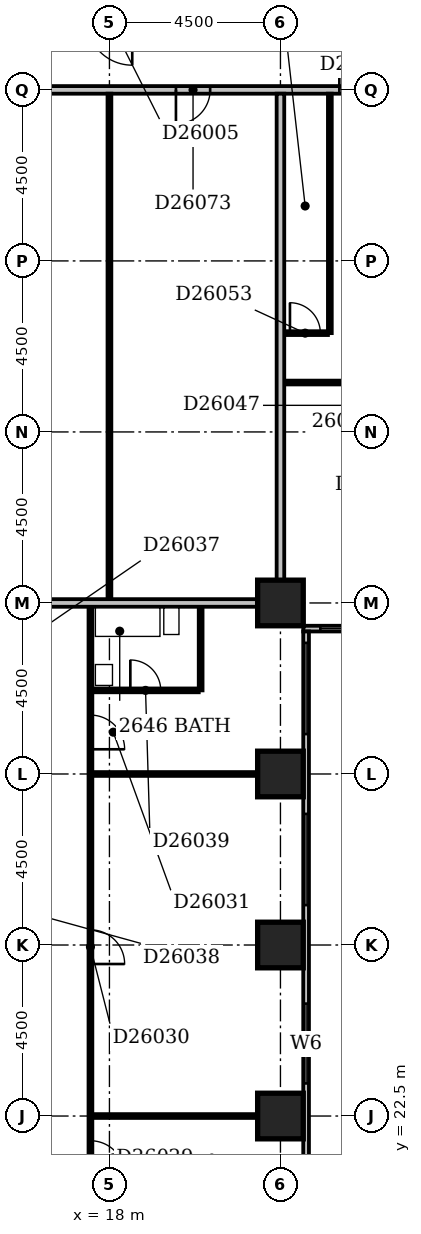
"""IFC4 building model, lengths in metres.
Left out: names, types, materials, properties, quantities, classifications, styles, units other than length and angle.
Written with IfcOpenShell. Run it as: python <this file> out.ifc"""

import sys

from ifc_helpers import new_model, si_unit, direction, frame, frame_2d, origin, origin_2d, place, context, subcontext, project, spatial, rectangle, extrude, element, fill, save


model = new_model("IFC4")
c1 = context("Model", 3, precision=1e-05, world=origin(), true_north=direction((0.0, 1.0)))
c2 = subcontext(c1, "Body", "Model", "MODEL_VIEW")
j1 = project(units=[si_unit("LENGTHUNIT", "METRE"), si_unit("PLANEANGLEUNIT", "RADIAN")], contexts=[c1])
p1 = place(None, origin())
s1 = spatial("IfcSite", under=j1, at=p1, CompositionType="ELEMENT")
p2 = place(p1, origin())
s2 = spatial("IfcBuilding", under=s1, at=p2, CompositionType="ELEMENT")
p3 = place(p2, frame((0.0, 0.0, 104.6)))
s3 = spatial("IfcBuildingStorey", under=s2, at=p3, CompositionType="ELEMENT", Elevation=104.6)
for number, where, z_axis, x_axis in (
    (1, (22.5, 22.5, -0.3), (0.0, 0.0, 1.0), (1.0, 0.0, 0.0)),
    (2, (22.5, 27.0, -0.3), (0.0, 0.0, 1.0), (1.0, 0.0, 0.0)),
    (3, (22.5, 31.5, -0.3), (0.0, 0.0, 1.0), (1.0, 0.0, 0.0)),
    (4, (22.5, 36.0, -0.3), (0.0, 0.0, 1.0), (1.0, 0.0, 0.0)),
):
    element("IfcColumn", number, at=place(p3, frame(where, z_axis=z_axis, x_axis=x_axis)), inside=s3, PredefinedType="COLUMN", context=c2, shape_type="SweptSolid", body=[
        extrude(rectangle(XDim=1.2, YDim=1.2, at=origin_2d()), origin(), (0.0, 0.0, 1.0), 3.45),
    ])
p4 = place(p3, frame((23.175, 17.4, 0.0), z_axis=(0.0, 0.0, 1.0), x_axis=(0.0, 1.0, 0.0)))
e5 = element("IfcWall", 5, at=p4, inside=s3, PredefinedType="STANDARD", context=c2, shape_type="SweptSolid", body=[
    extrude(rectangle(XDim=17.85, YDim=0.15, at=frame_2d((8.925, 0.0))), origin(), (0.0, 0.0, 1.0), 2.5),
])
p5 = place(p4, frame((1.65, 0.0, 0.6)))
e6 = element("IfcOpeningElement", 6, at=p5, cuts=e5, PredefinedType="OPENING", context=c2, shape_type="SweptSolid", body=[
    extrude(rectangle(XDim=2.4, YDim=1.8, at=frame_2d((1.2, 0.9))), frame((0.0, 0.087, 0.0), z_axis=(0.0, -1.0, 0.0), x_axis=(1.0, 0.0, 0.0)), (0.0, 0.0, 1.0), 0.174),
])
p6 = place(p4, frame((5.958, 0.0, 0.6)))
e7 = element("IfcOpeningElement", 7, at=p6, cuts=e5, PredefinedType="OPENING", context=c2, shape_type="SweptSolid", body=[
    extrude(rectangle(XDim=2.1, YDim=1.8, at=frame_2d((1.05, 0.9))), frame((0.0, 0.087, 0.0), z_axis=(0.0, -1.0, 0.0), x_axis=(1.0, 0.0, 0.0)), (0.0, 0.0, 1.0), 0.174),
])
p7 = place(p4, frame((10.65, 0.0, 0.6)))
e8 = element("IfcOpeningElement", 8, at=p7, cuts=e5, PredefinedType="OPENING", context=c2, shape_type="SweptSolid", body=[
    extrude(rectangle(XDim=2.4, YDim=1.8, at=frame_2d((1.2, 0.9))), frame((0.0, 0.087, 0.0), z_axis=(0.0, -1.0, 0.0), x_axis=(1.0, 0.0, 0.0)), (0.0, 0.0, 1.0), 0.174),
])
p8 = place(p4, frame((15.15, 0.0, 0.6)))
e9 = element("IfcOpeningElement", 9, at=p8, cuts=e5, PredefinedType="OPENING", context=c2, shape_type="SweptSolid", body=[
    extrude(rectangle(XDim=2.4, YDim=1.8, at=frame_2d((1.2, 0.9))), frame((0.0, 0.087, 0.0), z_axis=(0.0, -1.0, 0.0), x_axis=(1.0, 0.0, 0.0)), (0.0, 0.0, 1.0), 0.174),
])
p9 = place(p3, frame((23.1, 35.325, 0.0), z_axis=(0.0, 0.0, 1.0), x_axis=(1.0, 0.0, 0.0)))
e10 = element("IfcWall", 10, at=p9, inside=s3, PredefinedType="STANDARD", context=c2, shape_type="SweptSolid", body=[
    extrude(rectangle(XDim=45.15, YDim=0.15, at=frame_2d((22.575, 0.0))), origin(), (0.0, 0.0, 1.0), 2.5),
])
p10 = place(p9, frame((0.45, 0.0, 0.6)))
e11 = element("IfcOpeningElement", 11, at=p10, cuts=e10, PredefinedType="OPENING", context=c2, shape_type="SweptSolid", body=[
    extrude(rectangle(XDim=2.4, YDim=1.8, at=frame_2d((1.2, 0.9))), frame((0.0, 0.087, 0.0), z_axis=(0.0, -1.0, 0.0), x_axis=(1.0, 0.0, 0.0)), (0.0, 0.0, 1.0), 0.174),
])
p11 = place(p9, frame((4.831, 0.0, 0.6)))
e12 = element("IfcOpeningElement", 12, at=p11, cuts=e10, PredefinedType="OPENING", context=c2, shape_type="SweptSolid", body=[
    extrude(rectangle(XDim=0.9, YDim=1.8, at=frame_2d((0.45, 0.9))), frame((0.0, 0.087, 0.0), z_axis=(0.0, -1.0, 0.0), x_axis=(1.0, 0.0, 0.0)), (0.0, 0.0, 1.0), 0.174),
])
p12 = place(p9, frame((9.45, 0.0, 0.6)))
e13 = element("IfcOpeningElement", 13, at=p12, cuts=e10, PredefinedType="OPENING", context=c2, shape_type="SweptSolid", body=[
    extrude(rectangle(XDim=2.4, YDim=1.8, at=frame_2d((1.2, 0.9))), frame((0.0, 0.087, 0.0), z_axis=(0.0, -1.0, 0.0), x_axis=(1.0, 0.0, 0.0)), (0.0, 0.0, 1.0), 0.174),
])
p13 = place(p9, frame((13.95, 0.0, 0.6)))
e14 = element("IfcOpeningElement", 14, at=p13, cuts=e10, PredefinedType="OPENING", context=c2, shape_type="SweptSolid", body=[
    extrude(rectangle(XDim=2.4, YDim=1.8, at=frame_2d((1.2, 0.9))), frame((0.0, 0.087, 0.0), z_axis=(0.0, -1.0, 0.0), x_axis=(1.0, 0.0, 0.0)), (0.0, 0.0, 1.0), 0.174),
])
p14 = place(p9, frame((18.234, 0.0, 0.6)))
e15 = element("IfcOpeningElement", 15, at=p14, cuts=e10, PredefinedType="OPENING", context=c2, shape_type="SweptSolid", body=[
    extrude(rectangle(XDim=0.6, YDim=1.8, at=frame_2d((0.3, 0.9))), frame((0.0, 0.087, 0.0), z_axis=(0.0, -1.0, 0.0), x_axis=(1.0, 0.0, 0.0)), (0.0, 0.0, 1.0), 0.174),
])
p15 = place(p9, frame((20.492, 0.0, 0.6)))
e16 = element("IfcOpeningElement", 16, at=p15, cuts=e10, PredefinedType="OPENING", context=c2, shape_type="SweptSolid", body=[
    extrude(rectangle(XDim=0.6, YDim=1.8, at=frame_2d((0.3, 0.9))), frame((0.0, 0.087, 0.0), z_axis=(0.0, -1.0, 0.0), x_axis=(1.0, 0.0, 0.0)), (0.0, 0.0, 1.0), 0.174),
])
p16 = place(p9, frame((22.95, 0.0, 0.6)))
e17 = element("IfcOpeningElement", 17, at=p16, cuts=e10, PredefinedType="OPENING", context=c2, shape_type="SweptSolid", body=[
    extrude(rectangle(XDim=2.4, YDim=1.8, at=frame_2d((1.2, 0.9))), frame((0.0, 0.087, 0.0), z_axis=(0.0, -1.0, 0.0), x_axis=(1.0, 0.0, 0.0)), (0.0, 0.0, 1.0), 0.174),
])
p17 = place(p9, frame((27.45, 0.0, 0.6)))
e18 = element("IfcOpeningElement", 18, at=p17, cuts=e10, PredefinedType="OPENING", context=c2, shape_type="SweptSolid", body=[
    extrude(rectangle(XDim=2.4, YDim=1.8, at=frame_2d((1.2, 0.9))), frame((0.0, 0.087, 0.0), z_axis=(0.0, -1.0, 0.0), x_axis=(1.0, 0.0, 0.0)), (0.0, 0.0, 1.0), 0.174),
])
p18 = place(p9, frame((31.95, 0.0, 0.6)))
e19 = element("IfcOpeningElement", 19, at=p18, cuts=e10, PredefinedType="OPENING", context=c2, shape_type="SweptSolid", body=[
    extrude(rectangle(XDim=2.4, YDim=1.8, at=frame_2d((1.2, 0.9))), frame((0.0, 0.087, 0.0), z_axis=(0.0, -1.0, 0.0), x_axis=(1.0, 0.0, 0.0)), (0.0, 0.0, 1.0), 0.174),
])
p19 = place(p9, frame((36.45, 0.0, 0.6)))
e20 = element("IfcOpeningElement", 20, at=p19, cuts=e10, PredefinedType="OPENING", context=c2, shape_type="SweptSolid", body=[
    extrude(rectangle(XDim=2.4, YDim=1.8, at=frame_2d((1.2, 0.9))), frame((0.0, 0.087, 0.0), z_axis=(0.0, -1.0, 0.0), x_axis=(1.0, 0.0, 0.0)), (0.0, 0.0, 1.0), 0.174),
])
p20 = place(p9, frame((40.95, 0.0, 0.6)))
e21 = element("IfcOpeningElement", 21, at=p20, cuts=e10, PredefinedType="OPENING", context=c2, shape_type="SweptSolid", body=[
    extrude(rectangle(XDim=2.4, YDim=1.8, at=frame_2d((1.2, 0.9))), frame((0.0, 0.087, 0.0), z_axis=(0.0, -1.0, 0.0), x_axis=(1.0, 0.0, 0.0)), (0.0, 0.0, 1.0), 0.174),
])
p21 = place(p3, frame((17.5, 18.1, 0.0), z_axis=(0.0, 0.0, 1.0), x_axis=(0.0, 1.0, 0.0)))
e22 = element("IfcWall", 22, at=p21, inside=s3, PredefinedType="PARTITIONING", context=c2, shape_type="SweptSolid", body=[
    extrude(rectangle(XDim=17.8, YDim=0.1, at=frame_2d((8.9, 0.0))), origin(), (0.0, 0.0, 1.0), 3.15),
])
p22 = place(p21, frame((2.85, 0.0, 0.0)))
e23 = element("IfcOpeningElement", 23, at=p22, cuts=e22, PredefinedType="OPENING", context=c2, shape_type="SweptSolid", body=[
    extrude(rectangle(XDim=0.9, YDim=2.1, at=frame_2d((0.45, 1.05))), frame((0.0, 0.062, 0.0), z_axis=(0.0, -1.0, 0.0), x_axis=(1.0, 0.0, 0.0)), (0.0, 0.0, 1.0), 0.124),
])
p23 = place(p21, frame((8.4, 0.0, 0.0)))
e24 = element("IfcOpeningElement", 24, at=p23, cuts=e22, PredefinedType="OPENING", context=c2, shape_type="SweptSolid", body=[
    extrude(rectangle(XDim=0.9, YDim=2.1, at=frame_2d((0.45, 1.05))), frame((0.0, 0.062, 0.0), z_axis=(0.0, -1.0, 0.0), x_axis=(1.0, 0.0, 0.0)), (0.0, 0.0, 1.0), 0.124),
])
p24 = place(p21, frame((14.05, 0.0, 0.0)))
e25 = element("IfcOpeningElement", 25, at=p24, cuts=e22, PredefinedType="OPENING", context=c2, shape_type="SweptSolid", body=[
    extrude(rectangle(XDim=0.9, YDim=2.1, at=frame_2d((0.45, 1.05))), frame((0.0, 0.062, 0.0), z_axis=(0.0, -1.0, 0.0), x_axis=(1.0, 0.0, 0.0)), (0.0, 0.0, 1.0), 0.124),
])
for number, where, z_axis, x_axis in (
    (26, (17.55, 22.5, 0.0), (0.0, 0.0, 1.0), (1.0, 0.0, 0.0)),
    (27, (17.55, 31.5, 0.0), (0.0, 0.0, 1.0), (1.0, 0.0, 0.0)),
):
    element("IfcWall", number, at=place(p3, frame(where, z_axis=z_axis, x_axis=x_axis)), inside=s3, PredefinedType="PARTITIONING", context=c2, shape_type="SweptSolid", body=[
        extrude(rectangle(XDim=4.35, YDim=0.1, at=frame_2d((2.175, 0.0))), origin(), (0.0, 0.0, 1.0), 3.15),
    ])
p25 = place(p3, frame((17.55, 33.7, 0.0), z_axis=(0.0, 0.0, 1.0), x_axis=(1.0, 0.0, 0.0)))
e28 = element("IfcWall", 28, at=p25, inside=s3, PredefinedType="PLUMBINGWALL", context=c2, shape_type="SweptSolid", body=[
    extrude(rectangle(XDim=2.8, YDim=0.1, at=frame_2d((1.4, 0.0))), origin(), (0.0, 0.0, 1.0), 3.15),
])
p26 = place(p25, frame((1.0, 0.0, 0.0)))
e29 = element("IfcOpeningElement", 29, at=p26, cuts=e28, PredefinedType="OPENING", context=c2, shape_type="SweptSolid", body=[
    extrude(rectangle(XDim=0.8, YDim=2.1, at=frame_2d((0.4, 1.05))), frame((0.0, 0.062, 0.0), z_axis=(0.0, -1.0, 0.0), x_axis=(1.0, 0.0, 0.0)), (0.0, 0.0, 1.0), 0.124),
])
p27 = place(p3, frame((20.4, 33.7, 0.0), z_axis=(0.0, 0.0, 1.0), x_axis=(0.0, 1.0, 0.0)))
e30 = element("IfcWall", 30, at=p27, inside=s3, PredefinedType="PLUMBINGWALL", context=c2, shape_type="SweptSolid", body=[
    extrude(rectangle(XDim=2.2, YDim=0.1, at=frame_2d((1.1, 0.0))), origin(), (0.0, 0.0, 1.0), 3.15),
])
p28 = place(p3, frame((9.1, 36.0, 0.0), z_axis=(0.0, 0.0, 1.0), x_axis=(1.0, 0.0, 0.0)))
e31 = element("IfcWall", 31, at=p28, inside=s3, PredefinedType="PARTITIONING", context=c2, shape_type="SweptSolid", body=[
    extrude(rectangle(XDim=12.8, YDim=0.2, at=frame_2d((6.4, 0.0))), origin(), (0.0, 0.0, 1.0), 2.25),
])
p29 = place(p3, frame((18.0, 36.1, 0.0), z_axis=(0.0, 0.0, 1.0), x_axis=(0.0, 1.0, 0.0)))
e32 = element("IfcWall", 32, at=p29, inside=s3, PredefinedType="PARTITIONING", context=c2, shape_type="SweptSolid", body=[
    extrude(rectangle(XDim=13.3, YDim=0.1, at=frame_2d((6.65, 0.0))), origin(), (0.0, 0.0, 1.0), 3.15),
])
p30 = place(p3, frame((22.5, 36.6, 0.0), z_axis=(0.0, 0.0, 1.0), x_axis=(0.0, 1.0, 0.0)))
e33 = element("IfcWall", 33, at=p30, inside=s3, PredefinedType="PARTITIONING", context=c2, shape_type="SweptSolid", body=[
    extrude(rectangle(XDim=12.8, YDim=0.2, at=frame_2d((6.4, 0.0))), origin(), (0.0, 0.0, 1.0), 3.15),
])
p31 = place(p3, frame((22.6, 41.8, 0.0), z_axis=(0.0, 0.0, 1.0), x_axis=(1.0, 0.0, 0.0)))
e34 = element("IfcWall", 34, at=p31, inside=s3, PredefinedType="PARTITIONING", context=c2, shape_type="SweptSolid", body=[
    extrude(rectangle(XDim=4.3, YDim=0.1, at=frame_2d((2.15, 0.0))), origin(), (0.0, 0.0, 1.0), 3.15),
])
p32 = place(p31, frame((1.7, 0.0, 0.0)))
e35 = element("IfcOpeningElement", 35, at=p32, cuts=e34, PredefinedType="OPENING", context=c2, shape_type="SweptSolid", body=[
    extrude(rectangle(XDim=0.9, YDim=2.1, at=frame_2d((0.45, 1.05))), frame((0.0, 0.062, 0.0), z_axis=(0.0, -1.0, 0.0), x_axis=(1.0, 0.0, 0.0)), (0.0, 0.0, 1.0), 0.124),
])
p33 = place(p3, frame((22.6, 43.1, 0.0), z_axis=(0.0, 0.0, 1.0), x_axis=(1.0, 0.0, 0.0)))
e36 = element("IfcWall", 36, at=p33, inside=s3, PredefinedType="PARTITIONING", context=c2, shape_type="SweptSolid", body=[
    extrude(rectangle(XDim=1.15, YDim=0.1, at=frame_2d((0.575, 0.0))), origin(), (0.0, 0.0, 1.0), 3.15),
])
p34 = place(p33, frame((0.15, 0.0, 0.0)))
e37 = element("IfcOpeningElement", 37, at=p34, cuts=e36, PredefinedType="OPENING", context=c2, shape_type="SweptSolid", body=[
    extrude(rectangle(XDim=0.8, YDim=2.1, at=frame_2d((0.4, 1.05))), frame((0.0, 0.062, 0.0), z_axis=(0.0, -1.0, 0.0), x_axis=(1.0, 0.0, 0.0)), (0.0, 0.0, 1.0), 0.124),
])
p35 = place(p3, frame((23.8, 43.1, 0.0), z_axis=(0.0, 0.0, 1.0), x_axis=(0.0, 1.0, 0.0)))
e38 = element("IfcWall", 38, at=p35, inside=s3, PredefinedType="PARTITIONING", context=c2, shape_type="SweptSolid", body=[
    extrude(rectangle(XDim=6.3, YDim=0.1, at=frame_2d((3.15, 0.0))), origin(), (0.0, 0.0, 1.0), 3.15),
])
p36 = place(p3, frame((9.1, 49.5, 0.0), z_axis=(0.0, 0.0, 1.0), x_axis=(1.0, 0.0, 0.0)))
e39 = element("IfcWall", 39, at=p36, inside=s3, PredefinedType="PARTITIONING", context=c2, shape_type="SweptSolid", body=[
    extrude(rectangle(XDim=57.8, YDim=0.2, at=frame_2d((28.9, 0.0))), origin(), (0.0, 0.0, 1.0), 3.15),
])
p37 = place(p36, frame((14.95, 0.0, 0.0)))
e40 = element("IfcOpeningElement", 40, at=p37, cuts=e39, PredefinedType="OPENING", context=c2, shape_type="SweptSolid", body=[
    extrude(rectangle(XDim=1.0, YDim=2.1, at=frame_2d((0.5, 1.05))), frame((0.0, 0.112, 0.0), z_axis=(0.0, -1.0, 0.0), x_axis=(1.0, 0.0, 0.0)), (0.0, 0.0, 1.0), 0.224),
])
p38 = place(p36, frame((20.6, 0.0, 0.0)))
e41 = element("IfcOpeningElement", 41, at=p38, cuts=e39, PredefinedType="OPENING", context=c2, shape_type="SweptSolid", body=[
    extrude(rectangle(XDim=1.0, YDim=2.1, at=frame_2d((0.5, 1.05))), frame((0.0, 0.112, 0.0), z_axis=(0.0, -1.0, 0.0), x_axis=(1.0, 0.0, 0.0)), (0.0, 0.0, 1.0), 0.224),
])
p39 = place(p36, frame((27.2, 0.0, 0.0)))
e42 = element("IfcOpeningElement", 42, at=p39, cuts=e39, PredefinedType="OPENING", context=c2, shape_type="SweptSolid", body=[
    extrude(rectangle(XDim=1.0, YDim=2.1, at=frame_2d((0.5, 1.05))), frame((0.0, 0.112, 0.0), z_axis=(0.0, -1.0, 0.0), x_axis=(1.0, 0.0, 0.0)), (0.0, 0.0, 1.0), 0.224),
])
p40 = place(p36, frame((40.7, 0.0, 0.0)))
e43 = element("IfcOpeningElement", 43, at=p40, cuts=e39, PredefinedType="OPENING", context=c2, shape_type="SweptSolid", body=[
    extrude(rectangle(XDim=1.0, YDim=2.1, at=frame_2d((0.5, 1.05))), frame((0.0, 0.112, 0.0), z_axis=(0.0, -1.0, 0.0), x_axis=(1.0, 0.0, 0.0)), (0.0, 0.0, 1.0), 0.224),
])
p41 = place(p36, frame((10.65, 0.0, 0.0)))
e44 = element("IfcOpeningElement", 44, at=p41, cuts=e39, PredefinedType="OPENING", context=c2, shape_type="SweptSolid", body=[
    extrude(rectangle(XDim=0.9, YDim=2.1, at=frame_2d((0.45, 1.05))), frame((0.0, 0.112, 0.0), z_axis=(0.0, -1.0, 0.0), x_axis=(1.0, 0.0, 0.0)), (0.0, 0.0, 1.0), 0.224),
])
p42 = place(p6, origin())
e45 = element("IfcWindow", 45, at=p42, inside=s3, PartitioningType="SINGLE_PANEL", PredefinedType="WINDOW", context=c2, shape_type="SweptSolid", body=[
    extrude(rectangle(XDim=2.1, YDim=1.8, at=frame_2d((1.05, 0.9))), frame((0.0, 0.03, 0.0), z_axis=(0.0, -1.0, 0.0), x_axis=(1.0, 0.0, 0.0)), (0.0, 0.0, 1.0), 0.06),
])
fill(e7, e45)
p43 = place(p7, origin())
e46 = element("IfcWindow", 46, at=p43, inside=s3, PartitioningType="SINGLE_PANEL", PredefinedType="WINDOW", context=c2, shape_type="SweptSolid", body=[
    extrude(rectangle(XDim=2.4, YDim=1.8, at=frame_2d((1.2, 0.9))), frame((0.0, 0.03, 0.0), z_axis=(0.0, -1.0, 0.0), x_axis=(1.0, 0.0, 0.0)), (0.0, 0.0, 1.0), 0.06),
])
fill(e8, e46)
p44 = place(p8, origin())
e47 = element("IfcWindow", 47, at=p44, inside=s3, PartitioningType="SINGLE_PANEL", PredefinedType="WINDOW", context=c2, shape_type="SweptSolid", body=[
    extrude(rectangle(XDim=2.4, YDim=1.8, at=frame_2d((1.2, 0.9))), frame((0.0, 0.03, 0.0), z_axis=(0.0, -1.0, 0.0), x_axis=(1.0, 0.0, 0.0)), (0.0, 0.0, 1.0), 0.06),
])
fill(e9, e47)
p45 = place(p10, origin())
e48 = element("IfcWindow", 48, at=p45, inside=s3, PartitioningType="SINGLE_PANEL", PredefinedType="WINDOW", context=c2, shape_type="SweptSolid", body=[
    extrude(rectangle(XDim=2.4, YDim=1.8, at=frame_2d((1.2, 0.9))), frame((0.0, 0.03, 0.0), z_axis=(0.0, -1.0, 0.0), x_axis=(1.0, 0.0, 0.0)), (0.0, 0.0, 1.0), 0.06),
])
fill(e11, e48)
p46 = place(p22, frame((0.9, 0.0, 0.0), z_axis=(0.0, 0.0, 1.0), x_axis=(-1.0, 0.0, 0.0)))
e49 = element("IfcDoor", 49, at=p46, inside=s3, OperationType="SINGLE_SWING_RIGHT", PredefinedType="DOOR", context=c2, shape_type="SweptSolid", body=[
    extrude(rectangle(XDim=0.9, YDim=2.1, at=frame_2d((0.45, 1.05))), frame((0.0, 0.025, 0.0), z_axis=(0.0, -1.0, 0.0), x_axis=(1.0, 0.0, 0.0)), (0.0, 0.0, 1.0), 0.05),
])
fill(e23, e49)
p47 = place(p23, frame((0.9, 0.0, 0.0), z_axis=(0.0, 0.0, 1.0), x_axis=(-1.0, 0.0, 0.0)))
e50 = element("IfcDoor", 50, at=p47, inside=s3, OperationType="SINGLE_SWING_RIGHT", PredefinedType="DOOR", context=c2, shape_type="SweptSolid", body=[
    extrude(rectangle(XDim=0.9, YDim=2.1, at=frame_2d((0.45, 1.05))), frame((0.0, 0.025, 0.0), z_axis=(0.0, -1.0, 0.0), x_axis=(1.0, 0.0, 0.0)), (0.0, 0.0, 1.0), 0.05),
])
fill(e24, e50)
p48 = place(p24, frame((0.9, 0.0, 0.0), z_axis=(0.0, 0.0, 1.0), x_axis=(-1.0, 0.0, 0.0)))
e51 = element("IfcDoor", 51, at=p48, inside=s3, OperationType="SINGLE_SWING_RIGHT", PredefinedType="DOOR", context=c2, shape_type="SweptSolid", body=[
    extrude(rectangle(XDim=0.9, YDim=2.1, at=frame_2d((0.45, 1.05))), frame((0.0, 0.025, 0.0), z_axis=(0.0, -1.0, 0.0), x_axis=(1.0, 0.0, 0.0)), (0.0, 0.0, 1.0), 0.05),
])
fill(e25, e51)
p49 = place(p26, origin())
e52 = element("IfcDoor", 52, at=p49, inside=s3, OperationType="SINGLE_SWING_LEFT", PredefinedType="DOOR", context=c2, shape_type="SweptSolid", body=[
    extrude(rectangle(XDim=0.8, YDim=2.1, at=frame_2d((0.4, 1.05))), frame((0.0, 0.025, 0.0), z_axis=(0.0, -1.0, 0.0), x_axis=(1.0, 0.0, 0.0)), (0.0, 0.0, 1.0), 0.05),
])
fill(e29, e52)
p50 = place(p34, origin())
e53 = element("IfcDoor", 53, at=p50, inside=s3, OperationType="SINGLE_SWING_LEFT", PredefinedType="DOOR", context=c2, shape_type="SweptSolid", body=[
    extrude(rectangle(XDim=0.8, YDim=2.1, at=frame_2d((0.4, 1.05))), frame((0.0, 0.025, 0.0), z_axis=(0.0, -1.0, 0.0), x_axis=(1.0, 0.0, 0.0)), (0.0, 0.0, 1.0), 0.05),
])
fill(e37, e53)
p51 = place(p37, origin())
e54 = element("IfcDoor", 54, at=p51, inside=s3, OperationType="SINGLE_SWING_LEFT", PredefinedType="DOOR", context=c2, shape_type="SweptSolid", body=[
    extrude(rectangle(XDim=1.0, YDim=2.1, at=frame_2d((0.5, 1.05))), frame((0.0, 0.025, 0.0), z_axis=(0.0, -1.0, 0.0), x_axis=(1.0, 0.0, 0.0)), (0.0, 0.0, 1.0), 0.05),
])
fill(e40, e54)
p52 = place(p41, frame((0.9, 0.0, 0.0), z_axis=(0.0, 0.0, 1.0), x_axis=(-1.0, 0.0, 0.0)))
e55 = element("IfcDoor", 55, at=p52, inside=s3, OperationType="SINGLE_SWING_RIGHT", PredefinedType="DOOR", context=c2, shape_type="SweptSolid", body=[
    extrude(rectangle(XDim=0.9, YDim=2.1, at=frame_2d((0.45, 1.05))), frame((0.0, 0.025, 0.0), z_axis=(0.0, -1.0, 0.0), x_axis=(1.0, 0.0, 0.0)), (0.0, 0.0, 1.0), 0.05),
])
fill(e44, e55)
save(model, sys.argv[1])
